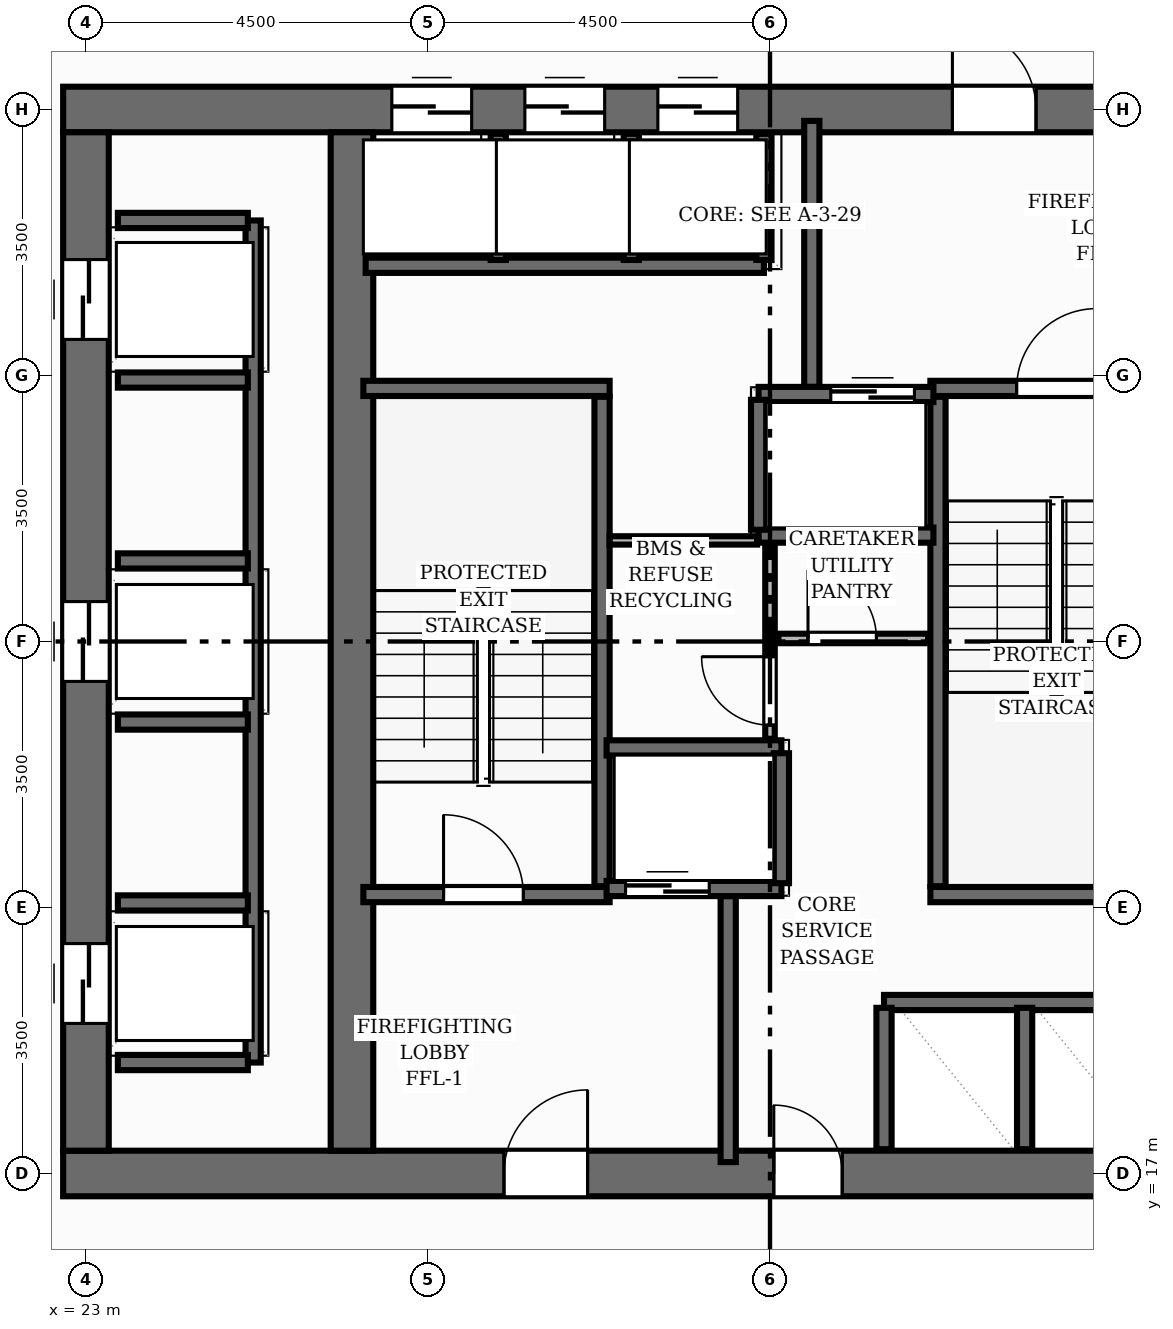
"""IFC4 building model, lengths in metres.
Left out: names, types, materials, properties, quantities, classifications, styles, units other than length and angle.
Written with IfcOpenShell. Run it as: python <this file> out.ifc"""

import sys

from ifc_helpers import new_model, si_unit, direction, frame, frame_2d, origin, place, context, subcontext, project, spatial, rectangle, extrude, element, fill, save


model = new_model("IFC4")
c1 = context("Model", 3, precision=1e-05, world=origin(), true_north=direction((0.0, 1.0)))
c2 = subcontext(c1, "Body", "Model", "MODEL_VIEW")
j1 = project(units=[si_unit("LENGTHUNIT", "METRE"), si_unit("PLANEANGLEUNIT", "RADIAN")], contexts=[c1])
p1 = place(None, origin())
s1 = spatial("IfcSite", under=j1, at=p1, CompositionType="ELEMENT")
p2 = place(p1, origin())
s2 = spatial("IfcBuilding", under=s1, at=p2, CompositionType="ELEMENT")
p3 = place(p2, frame((0.0, 0.0, 116.96)))
s3 = spatial("IfcBuildingStorey", under=s2, at=p3, CompositionType="ELEMENT", Elevation=116.96)
p4 = place(p3, frame((22.7, 17.0, 0.0), z_axis=(0.0, 0.0, 1.0), x_axis=(1.0, 0.0, 0.0)))
e1 = element("IfcWall", 1, at=p4, inside=s3, PredefinedType="SHEAR", context=c2, shape_type="SweptSolid", body=[
    extrude(rectangle(XDim=18.6, YDim=0.6, at=frame_2d((9.3, 0.0))), origin(), (0.0, 0.0, 1.0), 3.2),
])
p5 = place(p4, frame((5.8, 0.0, 0.0)))
e2 = element("IfcOpeningElement", 2, at=p5, cuts=e1, PredefinedType="OPENING", context=c2, shape_type="SweptSolid", body=[
    extrude(rectangle(XDim=1.1, YDim=2.15, at=frame_2d((0.55, 1.075))), frame((0.0, 0.31, 0.0), z_axis=(0.0, -1.0, 0.0), x_axis=(1.0, 0.0, 0.0)), (0.0, 0.0, 1.0), 0.62),
])
p6 = place(p4, frame((9.35, 0.0, 0.0)))
e3 = element("IfcOpeningElement", 3, at=p6, cuts=e1, PredefinedType="OPENING", context=c2, shape_type="SweptSolid", body=[
    extrude(rectangle(XDim=0.9, YDim=2.1, at=frame_2d((0.45, 1.05))), frame((0.0, 0.31, 0.0), z_axis=(0.0, -1.0, 0.0), x_axis=(1.0, 0.0, 0.0)), (0.0, 0.0, 1.0), 0.62),
])
p7 = place(p3, frame((22.7, 31.0, 0.0), z_axis=(0.0, 0.0, 1.0), x_axis=(1.0, 0.0, 0.0)))
e4 = element("IfcWall", 4, at=p7, inside=s3, PredefinedType="SHEAR", context=c2, shape_type="SweptSolid", body=[
    extrude(rectangle(XDim=18.6, YDim=0.6, at=frame_2d((9.3, 0.0))), origin(), (0.0, 0.0, 1.0), 3.2),
])
p8 = place(p7, frame((11.7, 0.0, 0.0)))
e5 = element("IfcOpeningElement", 5, at=p8, cuts=e4, PredefinedType="OPENING", context=c2, shape_type="SweptSolid", body=[
    extrude(rectangle(XDim=1.1, YDim=2.15, at=frame_2d((0.55, 1.075))), frame((0.0, 0.31, 0.0), z_axis=(0.0, -1.0, 0.0), x_axis=(1.0, 0.0, 0.0)), (0.0, 0.0, 1.0), 0.62),
])
p9 = place(p7, frame((4.325, 0.0, 0.0)))
e6 = element("IfcOpeningElement", 6, at=p9, cuts=e4, PredefinedType="OPENING", context=c2, shape_type="SweptSolid", body=[
    extrude(rectangle(XDim=1.05, YDim=2.15, at=frame_2d((0.525, 1.075))), frame((0.0, 0.31, 0.0), z_axis=(0.0, -1.0, 0.0), x_axis=(1.0, 0.0, 0.0)), (0.0, 0.0, 1.0), 0.62),
])
p10 = place(p7, frame((6.075, 0.0, 0.0)))
e7 = element("IfcOpeningElement", 7, at=p10, cuts=e4, PredefinedType="OPENING", context=c2, shape_type="SweptSolid", body=[
    extrude(rectangle(XDim=1.05, YDim=2.15, at=frame_2d((0.525, 1.075))), frame((0.0, 0.31, 0.0), z_axis=(0.0, -1.0, 0.0), x_axis=(1.0, 0.0, 0.0)), (0.0, 0.0, 1.0), 0.62),
])
p11 = place(p7, frame((7.825, 0.0, 0.0)))
e8 = element("IfcOpeningElement", 8, at=p11, cuts=e4, PredefinedType="OPENING", context=c2, shape_type="SweptSolid", body=[
    extrude(rectangle(XDim=1.05, YDim=2.15, at=frame_2d((0.525, 1.075))), frame((0.0, 0.31, 0.0), z_axis=(0.0, -1.0, 0.0), x_axis=(1.0, 0.0, 0.0)), (0.0, 0.0, 1.0), 0.62),
])
p12 = place(p3, frame((23.0, 17.3, 0.0), z_axis=(0.0, 0.0, 1.0), x_axis=(0.0, 1.0, 0.0)))
e9 = element("IfcWall", 9, at=p12, inside=s3, PredefinedType="SHEAR", context=c2, shape_type="SweptSolid", body=[
    extrude(rectangle(XDim=13.4, YDim=0.6, at=frame_2d((6.7, 0.0))), origin(), (0.0, 0.0, 1.0), 3.2),
])
p13 = place(p12, frame((1.675, 0.0, 0.0)))
e10 = element("IfcOpeningElement", 10, at=p13, cuts=e9, PredefinedType="OPENING", context=c2, shape_type="SweptSolid", body=[
    extrude(rectangle(XDim=1.05, YDim=2.15, at=frame_2d((0.525, 1.075))), frame((0.0, 0.31, 0.0), z_axis=(0.0, -1.0, 0.0), x_axis=(1.0, 0.0, 0.0)), (0.0, 0.0, 1.0), 0.62),
])
p14 = place(p12, frame((6.175, 0.0, 0.0)))
e11 = element("IfcOpeningElement", 11, at=p14, cuts=e9, PredefinedType="OPENING", context=c2, shape_type="SweptSolid", body=[
    extrude(rectangle(XDim=1.05, YDim=2.15, at=frame_2d((0.525, 1.075))), frame((0.0, 0.31, 0.0), z_axis=(0.0, -1.0, 0.0), x_axis=(1.0, 0.0, 0.0)), (0.0, 0.0, 1.0), 0.62),
])
p15 = place(p12, frame((10.675, 0.0, 0.0)))
e12 = element("IfcOpeningElement", 12, at=p15, cuts=e9, PredefinedType="OPENING", context=c2, shape_type="SweptSolid", body=[
    extrude(rectangle(XDim=1.05, YDim=2.15, at=frame_2d((0.525, 1.075))), frame((0.0, 0.31, 0.0), z_axis=(0.0, -1.0, 0.0), x_axis=(1.0, 0.0, 0.0)), (0.0, 0.0, 1.0), 0.62),
])
p16 = place(p3, frame((26.5, 17.3, 0.0), z_axis=(0.0, 0.0, 1.0), x_axis=(0.0, 1.0, 0.0)))
e13 = element("IfcWall", 13, at=p16, inside=s3, PredefinedType="SHEAR", context=c2, shape_type="SweptSolid", body=[
    extrude(rectangle(XDim=13.4, YDim=0.56, at=frame_2d((6.7, 0.0))), origin(), (0.0, 0.0, 1.0), 3.2),
])
p17 = place(p3, frame((29.79, 20.78, 0.0), z_axis=(0.0, 0.0, 1.0), x_axis=(0.0, 1.0, 0.0)))
e14 = element("IfcWall", 14, at=p17, inside=s3, PredefinedType="SHEAR", context=c2, shape_type="SweptSolid", body=[
    extrude(rectangle(XDim=6.44, YDim=0.2, at=frame_2d((3.22, 0.0))), origin(), (0.0, 0.0, 1.0), 3.2),
])
p18 = place(p3, frame((26.65, 27.33, 0.0), z_axis=(0.0, 0.0, 1.0), x_axis=(1.0, 0.0, 0.0)))
e15 = element("IfcWall", 15, at=p18, inside=s3, PredefinedType="SHEAR", context=c2, shape_type="SweptSolid", body=[
    extrude(rectangle(XDim=3.24, YDim=0.2, at=frame_2d((1.62, 0.0))), origin(), (0.0, 0.0, 1.0), 3.2),
])
p19 = place(p3, frame((26.65, 20.67, 0.0), z_axis=(0.0, 0.0, 1.0), x_axis=(1.0, 0.0, 0.0)))
e16 = element("IfcWall", 16, at=p19, inside=s3, PredefinedType="SHEAR", context=c2, shape_type="SweptSolid", body=[
    extrude(rectangle(XDim=3.24, YDim=0.2, at=frame_2d((1.62, 0.0))), origin(), (0.0, 0.0, 1.0), 3.2),
])
p20 = place(p19, frame((1.055, 0.0, 0.0)))
e17 = element("IfcOpeningElement", 17, at=p20, cuts=e16, PredefinedType="OPENING", context=c2, shape_type="SweptSolid", body=[
    extrude(rectangle(XDim=1.05, YDim=2.15, at=frame_2d((0.525, 1.075))), frame((0.0, 0.11, 0.0), z_axis=(0.0, -1.0, 0.0), x_axis=(1.0, 0.0, 0.0)), (0.0, 0.0, 1.0), 0.22),
])
p21 = place(p3, frame((34.21, 20.78, 0.0), z_axis=(0.0, 0.0, 1.0), x_axis=(0.0, 1.0, 0.0)))
e18 = element("IfcWall", 18, at=p21, inside=s3, PredefinedType="SHEAR", context=c2, shape_type="SweptSolid", body=[
    extrude(rectangle(XDim=6.44, YDim=0.2, at=frame_2d((3.22, 0.0))), origin(), (0.0, 0.0, 1.0), 3.2),
])
p22 = place(p3, frame((34.11, 20.67, 0.0), z_axis=(0.0, 0.0, 1.0), x_axis=(1.0, 0.0, 0.0)))
e19 = element("IfcWall", 19, at=p22, inside=s3, PredefinedType="SHEAR", context=c2, shape_type="SweptSolid", body=[
    extrude(rectangle(XDim=3.24, YDim=0.2, at=frame_2d((1.62, 0.0))), origin(), (0.0, 0.0, 1.0), 3.2),
])
p23 = place(p3, frame((34.11, 27.33, 0.0), z_axis=(0.0, 0.0, 1.0), x_axis=(1.0, 0.0, 0.0)))
e20 = element("IfcWall", 20, at=p23, inside=s3, PredefinedType="SHEAR", context=c2, shape_type="SweptSolid", body=[
    extrude(rectangle(XDim=3.24, YDim=0.2, at=frame_2d((1.62, 0.0))), origin(), (0.0, 0.0, 1.0), 3.2),
])
p24 = place(p23, frame((1.135, 0.0, 0.0)))
e21 = element("IfcOpeningElement", 21, at=p24, cuts=e20, PredefinedType="OPENING", context=c2, shape_type="SweptSolid", body=[
    extrude(rectangle(XDim=1.05, YDim=2.15, at=frame_2d((0.525, 1.075))), frame((0.0, 0.11, 0.0), z_axis=(0.0, -1.0, 0.0), x_axis=(1.0, 0.0, 0.0)), (0.0, 0.0, 1.0), 0.22),
])
for number, where, z_axis, x_axis in (
    (22, (31.45, 17.15, 0.0), (0.0, 0.0, 1.0), (0.0, 1.0, 0.0)),
    (23, (32.55, 27.35, 0.0), (0.0, 0.0, 1.0), (0.0, 1.0, 0.0)),
):
    element("IfcWall", number, at=place(p3, frame(where, z_axis=z_axis, x_axis=x_axis)), inside=s3, PredefinedType="SHEAR", context=c2, shape_type="SweptSolid", body=[
        extrude(rectangle(XDim=3.5, YDim=0.2, at=frame_2d((1.75, 0.0))), origin(), (0.0, 0.0, 1.0), 3.2),
    ])
p25 = place(p3, frame((29.85, 20.75, 0.0), z_axis=(0.0, 0.0, 1.0), x_axis=(1.0, 0.0, 0.0)))
e24 = element("IfcWall", 24, at=p25, inside=s3, PredefinedType="SHEAR", context=c2, shape_type="SweptSolid", body=[
    extrude(rectangle(XDim=2.3, YDim=0.2, at=frame_2d((1.15, 0.0))), origin(), (0.0, 0.0, 1.0), 3.2),
])
p26 = place(p25, frame((0.25, 0.0, 0.0)))
e25 = element("IfcOpeningElement", 25, at=p26, cuts=e24, PredefinedType="OPENING", context=c2, shape_type="SweptSolid", body=[
    extrude(rectangle(XDim=1.1, YDim=2.15, at=frame_2d((0.55, 1.075))), frame((0.0, 0.11, 0.0), z_axis=(0.0, -1.0, 0.0), x_axis=(1.0, 0.0, 0.0)), (0.0, 0.0, 1.0), 0.22),
])
p27 = place(p3, frame((29.85, 22.6, 0.0), z_axis=(0.0, 0.0, 1.0), x_axis=(1.0, 0.0, 0.0)))
e26 = element("IfcWall", 26, at=p27, inside=s3, PredefinedType="SHEAR", context=c2, shape_type="SweptSolid", body=[
    extrude(rectangle(XDim=2.3, YDim=0.2, at=frame_2d((1.15, 0.0))), origin(), (0.0, 0.0, 1.0), 3.2),
])
p28 = place(p3, frame((32.15, 20.82, 0.0), z_axis=(0.0, 0.0, 1.0), x_axis=(0.0, 1.0, 0.0)))
e27 = element("IfcWall", 27, at=p28, inside=s3, PredefinedType="SHEAR", context=c2, shape_type="SweptSolid", body=[
    extrude(rectangle(XDim=1.71, YDim=0.2, at=frame_2d((0.855, 0.0))), origin(), (0.0, 0.0, 1.0), 3.2),
])
p29 = place(p3, frame((31.85, 27.25, 0.0), z_axis=(0.0, 0.0, 1.0), x_axis=(1.0, 0.0, 0.0)))
e28 = element("IfcWall", 28, at=p29, inside=s3, PredefinedType="SHEAR", context=c2, shape_type="SweptSolid", body=[
    extrude(rectangle(XDim=2.3, YDim=0.2, at=frame_2d((1.15, 0.0))), origin(), (0.0, 0.0, 1.0), 3.2),
])
p30 = place(p29, frame((0.95, 0.0, 0.0)))
e29 = element("IfcOpeningElement", 29, at=p30, cuts=e28, PredefinedType="OPENING", context=c2, shape_type="SweptSolid", body=[
    extrude(rectangle(XDim=1.1, YDim=2.15, at=frame_2d((0.55, 1.075))), frame((0.0, 0.11, 0.0), z_axis=(0.0, -1.0, 0.0), x_axis=(1.0, 0.0, 0.0)), (0.0, 0.0, 1.0), 0.22),
])
p31 = place(p3, frame((31.85, 25.4, 0.0), z_axis=(0.0, 0.0, 1.0), x_axis=(1.0, 0.0, 0.0)))
e30 = element("IfcWall", 30, at=p31, inside=s3, PredefinedType="SHEAR", context=c2, shape_type="SweptSolid", body=[
    extrude(rectangle(XDim=2.3, YDim=0.2, at=frame_2d((1.15, 0.0))), origin(), (0.0, 0.0, 1.0), 3.2),
])
p32 = place(p3, frame((31.85, 25.47, 0.0), z_axis=(0.0, 0.0, 1.0), x_axis=(0.0, 1.0, 0.0)))
e31 = element("IfcWall", 31, at=p32, inside=s3, PredefinedType="SHEAR", context=c2, shape_type="SweptSolid", body=[
    extrude(rectangle(XDim=1.71, YDim=0.2, at=frame_2d((0.855, 0.0))), origin(), (0.0, 0.0, 1.0), 3.2),
])
p33 = place(p3, frame((25.2, 18.46, 0.0), z_axis=(0.0, 0.0, 1.0), x_axis=(0.0, 1.0, 0.0)))
e32 = element("IfcWall", 32, at=p33, inside=s3, PredefinedType="SHEAR", context=c2, shape_type="SweptSolid", body=[
    extrude(rectangle(XDim=11.08, YDim=0.2, at=frame_2d((5.54, 0.0))), origin(), (0.0, 0.0, 1.0), 3.2),
])
for number, where, z_axis, x_axis in (
    (33, (23.42, 18.46, 0.0), (0.0, 0.0, 1.0), (1.0, 0.0, 0.0)),
    (34, (23.42, 29.54, 0.0), (0.0, 0.0, 1.0), (1.0, 0.0, 0.0)),
    (35, (23.42, 20.56, 0.0), (0.0, 0.0, 1.0), (1.0, 0.0, 0.0)),
    (36, (23.42, 22.94, 0.0), (0.0, 0.0, 1.0), (1.0, 0.0, 0.0)),
    (37, (23.42, 25.06, 0.0), (0.0, 0.0, 1.0), (1.0, 0.0, 0.0)),
    (38, (23.42, 27.44, 0.0), (0.0, 0.0, 1.0), (1.0, 0.0, 0.0)),
):
    element("IfcWall", number, at=place(p3, frame(where, z_axis=z_axis, x_axis=x_axis)), inside=s3, PredefinedType="SHEAR", context=c2, shape_type="SweptSolid", body=[
        extrude(rectangle(XDim=1.71, YDim=0.2, at=frame_2d((0.855, 0.0))), origin(), (0.0, 0.0, 1.0), 3.2),
    ])
p34 = place(p3, frame((26.68, 28.95, 0.0), z_axis=(0.0, 0.0, 1.0), x_axis=(1.0, 0.0, 0.0)))
e39 = element("IfcWall", 39, at=p34, inside=s3, PredefinedType="SHEAR", context=c2, shape_type="SweptSolid", body=[
    extrude(rectangle(XDim=5.24, YDim=0.2, at=frame_2d((2.62, 0.0))), origin(), (0.0, 0.0, 1.0), 3.2),
])
for number, where, z_axis, x_axis in (
    (40, (31.92, 29.02, 0.0), (0.0, 0.0, 1.0), (0.0, 1.0, 0.0)),
    (41, (28.425, 29.02, 0.0), (0.0, 0.0, 1.0), (0.0, 1.0, 0.0)),
    (42, (30.175, 29.02, 0.0), (0.0, 0.0, 1.0), (0.0, 1.0, 0.0)),
):
    element("IfcWall", number, at=place(p3, frame(where, z_axis=z_axis, x_axis=x_axis)), inside=s3, PredefinedType="SHEAR", context=c2, shape_type="SweptSolid", body=[
        extrude(rectangle(XDim=1.66, YDim=0.2, at=frame_2d((0.83, 0.0))), origin(), (0.0, 0.0, 1.0), 3.2),
    ])
p35 = place(p3, frame((33.5, 19.25, 0.0), z_axis=(0.0, 0.0, 1.0), x_axis=(1.0, 0.0, 0.0)))
e43 = element("IfcWall", 43, at=p35, inside=s3, PredefinedType="SHEAR", context=c2, shape_type="SweptSolid", body=[
    extrude(rectangle(XDim=3.72, YDim=0.2, at=frame_2d((1.86, 0.0))), origin(), (0.0, 0.0, 1.0), 3.2),
])
for number, where, z_axis, x_axis in (
    (44, (33.5, 17.32, 0.0), (0.0, 0.0, 1.0), (0.0, 1.0, 0.0)),
    (45, (35.35, 17.32, 0.0), (0.0, 0.0, 1.0), (0.0, 1.0, 0.0)),
):
    element("IfcWall", number, at=place(p3, frame(where, z_axis=z_axis, x_axis=x_axis)), inside=s3, PredefinedType="SHEAR", context=c2, shape_type="SweptSolid", body=[
        extrude(rectangle(XDim=1.86, YDim=0.2, at=frame_2d((0.93, 0.0))), origin(), (0.0, 0.0, 1.0), 3.2),
    ])
p36 = place(p3, frame((32.0, 22.72, 0.0), z_axis=(0.0, 0.0, 1.0), x_axis=(0.0, 1.0, 0.0)))
e46 = element("IfcWall", 46, at=p36, inside=s3, PredefinedType="PARTITIONING", context=c2, shape_type="SweptSolid", body=[
    extrude(rectangle(XDim=2.52, YDim=0.125, at=frame_2d((1.26, 0.0))), origin(), (0.0, 0.0, 1.0), 2.955),
])
p37 = place(p36, frame((0.18, 0.0, 0.0)))
e47 = element("IfcOpeningElement", 47, at=p37, cuts=e46, PredefinedType="OPENING", context=c2, shape_type="SweptSolid", body=[
    extrude(rectangle(XDim=0.9, YDim=2.1, at=frame_2d((0.45, 1.05))), frame((0.0, 0.073, 0.0), z_axis=(0.0, -1.0, 0.0), x_axis=(1.0, 0.0, 0.0)), (0.0, 0.0, 1.0), 0.145),
])
p38 = place(p3, frame((32.11, 24.04, 0.0), z_axis=(0.0, 0.0, 1.0), x_axis=(1.0, 0.0, 0.0)))
e48 = element("IfcWall", 48, at=p38, inside=s3, PredefinedType="PARTITIONING", context=c2, shape_type="SweptSolid", body=[
    extrude(rectangle(XDim=1.97, YDim=0.125, at=frame_2d((0.985, 0.0))), origin(), (0.0, 0.0, 1.0), 2.955),
])
p39 = place(p38, frame((0.39, 0.0, 0.0)))
e49 = element("IfcOpeningElement", 49, at=p39, cuts=e48, PredefinedType="OPENING", context=c2, shape_type="SweptSolid", body=[
    extrude(rectangle(XDim=0.9, YDim=2.1, at=frame_2d((0.45, 1.05))), frame((0.0, 0.073, 0.0), z_axis=(0.0, -1.0, 0.0), x_axis=(1.0, 0.0, 0.0)), (0.0, 0.0, 1.0), 0.145),
])
p40 = place(p3, frame((29.89, 25.33, 0.0), z_axis=(0.0, 0.0, 1.0), x_axis=(1.0, 0.0, 0.0)))
e50 = element("IfcWall", 50, at=p40, inside=s3, PredefinedType="MOVABLE", context=c2, shape_type="SweptSolid", body=[
    extrude(rectangle(XDim=1.94, YDim=0.11, at=frame_2d((0.97, 0.0))), origin(), (0.0, 0.0, 1.0), 2.955),
])
p41 = place(p20, origin())
e51 = element("IfcDoor", 51, at=p41, inside=s3, OperationType="SINGLE_SWING_LEFT", PredefinedType="DOOR", context=c2, shape_type="SweptSolid", body=[
    extrude(rectangle(XDim=1.05, YDim=2.15, at=frame_2d((0.525, 1.075))), frame((0.0, 0.025, 0.0), z_axis=(0.0, -1.0, 0.0), x_axis=(1.0, 0.0, 0.0)), (0.0, 0.0, 1.0), 0.05),
])
fill(e17, e51)
p42 = place(p24, origin())
e52 = element("IfcDoor", 52, at=p42, inside=s3, OperationType="SINGLE_SWING_RIGHT", PredefinedType="DOOR", context=c2, shape_type="SweptSolid", body=[
    extrude(rectangle(XDim=1.05, YDim=2.15, at=frame_2d((0.525, 1.075))), frame((0.0, 0.025, 0.0), z_axis=(0.0, -1.0, 0.0), x_axis=(1.0, 0.0, 0.0)), (0.0, 0.0, 1.0), 0.05),
])
fill(e21, e52)
p43 = place(p5, origin())
e53 = element("IfcDoor", 53, at=p43, inside=s3, OperationType="SINGLE_SWING_RIGHT", PredefinedType="DOOR", context=c2, shape_type="SweptSolid", body=[
    extrude(rectangle(XDim=1.1, YDim=2.15, at=frame_2d((0.55, 1.075))), frame((0.0, 0.025, 0.0), z_axis=(0.0, -1.0, 0.0), x_axis=(1.0, 0.0, 0.0)), (0.0, 0.0, 1.0), 0.05),
])
fill(e2, e53)
p44 = place(p8, origin())
e54 = element("IfcDoor", 54, at=p44, inside=s3, OperationType="SINGLE_SWING_LEFT", PredefinedType="DOOR", context=c2, shape_type="SweptSolid", body=[
    extrude(rectangle(XDim=1.1, YDim=2.15, at=frame_2d((0.55, 1.075))), frame((0.0, 0.025, 0.0), z_axis=(0.0, -1.0, 0.0), x_axis=(1.0, 0.0, 0.0)), (0.0, 0.0, 1.0), 0.05),
])
fill(e5, e54)
p45 = place(p26, origin())
e55 = element("IfcDoor", 55, at=p45, inside=s3, OperationType="DOUBLE_DOOR_SLIDING", PredefinedType="DOOR", context=c2, shape_type="SweptSolid", body=[
    extrude(rectangle(XDim=1.1, YDim=2.15, at=frame_2d((0.55, 1.075))), frame((0.0, 0.025, 0.0), z_axis=(0.0, -1.0, 0.0), x_axis=(1.0, 0.0, 0.0)), (0.0, 0.0, 1.0), 0.05),
])
fill(e25, e55)
p46 = place(p30, origin())
e56 = element("IfcDoor", 56, at=p46, inside=s3, OperationType="DOUBLE_DOOR_SLIDING", PredefinedType="DOOR", context=c2, shape_type="SweptSolid", body=[
    extrude(rectangle(XDim=1.1, YDim=2.15, at=frame_2d((0.55, 1.075))), frame((0.0, 0.025, 0.0), z_axis=(0.0, -1.0, 0.0), x_axis=(1.0, 0.0, 0.0)), (0.0, 0.0, 1.0), 0.05),
])
fill(e29, e56)
p47 = place(p13, origin())
e57 = element("IfcDoor", 57, at=p47, inside=s3, OperationType="DOUBLE_DOOR_SLIDING", PredefinedType="DOOR", context=c2, shape_type="SweptSolid", body=[
    extrude(rectangle(XDim=1.05, YDim=2.15, at=frame_2d((0.525, 1.075))), frame((0.0, 0.025, 0.0), z_axis=(0.0, -1.0, 0.0), x_axis=(1.0, 0.0, 0.0)), (0.0, 0.0, 1.0), 0.05),
])
fill(e10, e57)
p48 = place(p14, origin())
e58 = element("IfcDoor", 58, at=p48, inside=s3, OperationType="DOUBLE_DOOR_SLIDING", PredefinedType="DOOR", context=c2, shape_type="SweptSolid", body=[
    extrude(rectangle(XDim=1.05, YDim=2.15, at=frame_2d((0.525, 1.075))), frame((0.0, 0.025, 0.0), z_axis=(0.0, -1.0, 0.0), x_axis=(1.0, 0.0, 0.0)), (0.0, 0.0, 1.0), 0.05),
])
fill(e11, e58)
p49 = place(p15, origin())
e59 = element("IfcDoor", 59, at=p49, inside=s3, OperationType="DOUBLE_DOOR_SLIDING", PredefinedType="DOOR", context=c2, shape_type="SweptSolid", body=[
    extrude(rectangle(XDim=1.05, YDim=2.15, at=frame_2d((0.525, 1.075))), frame((0.0, 0.025, 0.0), z_axis=(0.0, -1.0, 0.0), x_axis=(1.0, 0.0, 0.0)), (0.0, 0.0, 1.0), 0.05),
])
fill(e12, e59)
p50 = place(p9, origin())
e60 = element("IfcDoor", 60, at=p50, inside=s3, OperationType="DOUBLE_DOOR_SLIDING", PredefinedType="DOOR", context=c2, shape_type="SweptSolid", body=[
    extrude(rectangle(XDim=1.05, YDim=2.15, at=frame_2d((0.525, 1.075))), frame((0.0, 0.025, 0.0), z_axis=(0.0, -1.0, 0.0), x_axis=(1.0, 0.0, 0.0)), (0.0, 0.0, 1.0), 0.05),
])
fill(e6, e60)
p51 = place(p10, origin())
e61 = element("IfcDoor", 61, at=p51, inside=s3, OperationType="DOUBLE_DOOR_SLIDING", PredefinedType="DOOR", context=c2, shape_type="SweptSolid", body=[
    extrude(rectangle(XDim=1.05, YDim=2.15, at=frame_2d((0.525, 1.075))), frame((0.0, 0.025, 0.0), z_axis=(0.0, -1.0, 0.0), x_axis=(1.0, 0.0, 0.0)), (0.0, 0.0, 1.0), 0.05),
])
fill(e7, e61)
p52 = place(p11, origin())
e62 = element("IfcDoor", 62, at=p52, inside=s3, OperationType="DOUBLE_DOOR_SLIDING", PredefinedType="DOOR", context=c2, shape_type="SweptSolid", body=[
    extrude(rectangle(XDim=1.05, YDim=2.15, at=frame_2d((0.525, 1.075))), frame((0.0, 0.025, 0.0), z_axis=(0.0, -1.0, 0.0), x_axis=(1.0, 0.0, 0.0)), (0.0, 0.0, 1.0), 0.05),
])
fill(e8, e62)
p53 = place(p6, origin())
e63 = element("IfcDoor", 63, at=p53, inside=s3, OperationType="SINGLE_SWING_LEFT", PredefinedType="DOOR", context=c2, shape_type="SweptSolid", body=[
    extrude(rectangle(XDim=0.9, YDim=2.1, at=frame_2d((0.45, 1.05))), frame((0.0, 0.025, 0.0), z_axis=(0.0, -1.0, 0.0), x_axis=(1.0, 0.0, 0.0)), (0.0, 0.0, 1.0), 0.05),
])
fill(e3, e63)
p54 = place(p39, origin())
e64 = element("IfcDoor", 64, at=p54, inside=s3, OperationType="SINGLE_SWING_LEFT", PredefinedType="DOOR", context=c2, shape_type="SweptSolid", body=[
    extrude(rectangle(XDim=0.9, YDim=2.1, at=frame_2d((0.45, 1.05))), frame((0.0, 0.025, 0.0), z_axis=(0.0, -1.0, 0.0), x_axis=(1.0, 0.0, 0.0)), (0.0, 0.0, 1.0), 0.05),
])
fill(e49, e64)
p55 = place(p37, origin())
e65 = element("IfcDoor", 65, at=p55, inside=s3, OperationType="SINGLE_SWING_RIGHT", PredefinedType="DOOR", context=c2, shape_type="SweptSolid", body=[
    extrude(rectangle(XDim=0.9, YDim=2.1, at=frame_2d((0.45, 1.05))), frame((0.0, 0.025, 0.0), z_axis=(0.0, -1.0, 0.0), x_axis=(1.0, 0.0, 0.0)), (0.0, 0.0, 1.0), 0.05),
])
fill(e47, e65)
save(model, sys.argv[1])
